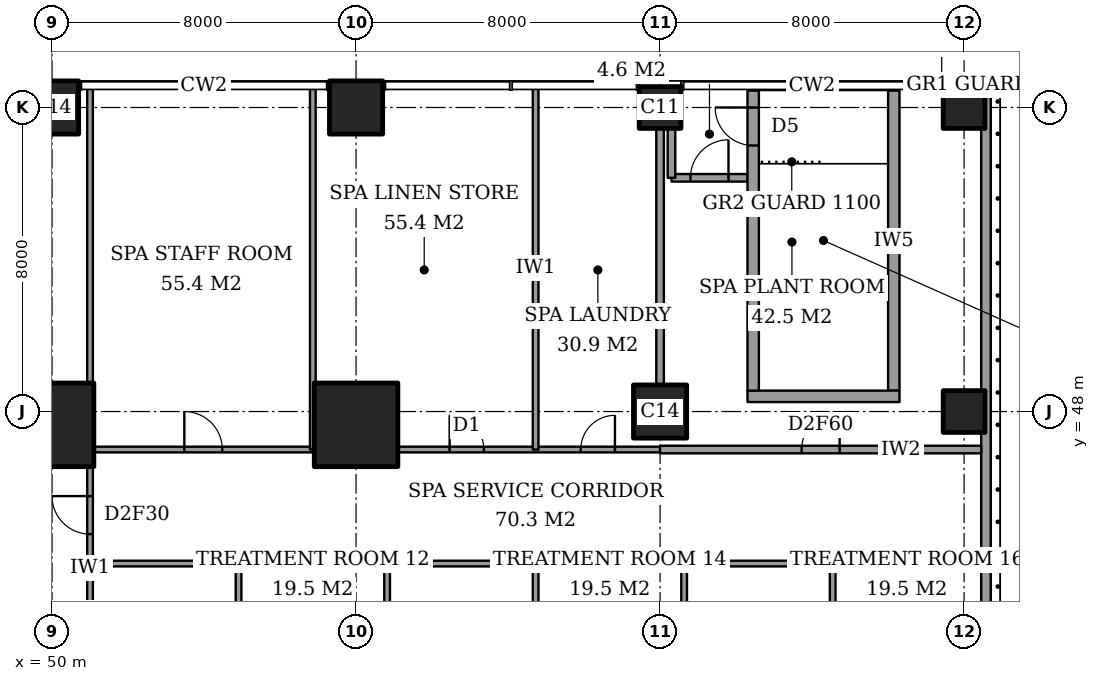
"""IFC4 building model, lengths in metres.
Left out: names, types, materials, properties, quantities, classifications, styles, units other than length and angle.
Written with IfcOpenShell. Run it as: python <this file> out.ifc"""

import sys

from ifc_helpers import new_model, si_unit, direction, frame, frame_2d, origin, origin_2d, place, context, subcontext, project, spatial, rectangle, extrude, element, fill, save


model = new_model("IFC4")
c1 = context("Model", 3, precision=1e-05, world=origin(), true_north=direction((0.0, 1.0)))
c2 = subcontext(c1, "Body", "Model", "MODEL_VIEW")
j1 = project(units=[si_unit("LENGTHUNIT", "METRE"), si_unit("PLANEANGLEUNIT", "RADIAN")], contexts=[c1])
p1 = place(None, origin())
s1 = spatial("IfcSite", under=j1, at=p1, CompositionType="ELEMENT")
p2 = place(p1, origin())
s2 = spatial("IfcBuilding", under=s1, at=p2, CompositionType="ELEMENT")
p3 = place(p2, frame((0.0, 0.0, 11.0)))
s3 = spatial("IfcBuildingStorey", under=s2, at=p3, CompositionType="ELEMENT", Elevation=11.0)
p4 = place(p3, frame((50.0, 47.65, 0.0), z_axis=(0.0, 0.0, 1.0), x_axis=(1.0, 0.0, 0.0)))
e1 = element("IfcColumn", 1, at=p4, inside=s3, PredefinedType="COLUMN", context=c2, shape_type="SweptSolid", body=[
    extrude(rectangle(XDim=2.2, YDim=2.2, at=origin_2d()), origin(), (0.0, 0.0, 1.0), 5.0),
])
p5 = place(p3, frame((50.0, 56.0, 0.0), z_axis=(0.0, 0.0, 1.0), x_axis=(1.0, 0.0, 0.0)))
e2 = element("IfcColumn", 2, at=p5, inside=s3, PredefinedType="COLUMN", context=c2, shape_type="SweptSolid", body=[
    extrude(rectangle(XDim=1.4, YDim=1.4, at=origin_2d()), origin(), (0.0, 0.0, 1.0), 5.0),
])
p6 = place(p3, frame((58.0, 47.65, 0.0), z_axis=(0.0, 0.0, 1.0), x_axis=(1.0, 0.0, 0.0)))
e3 = element("IfcColumn", 3, at=p6, inside=s3, PredefinedType="COLUMN", context=c2, shape_type="SweptSolid", body=[
    extrude(rectangle(XDim=2.2, YDim=2.2, at=origin_2d()), origin(), (0.0, 0.0, 1.0), 5.0),
])
for number, where, z_axis, x_axis in (
    (4, (58.0, 56.0, 0.0), (0.0, 0.0, 1.0), (1.0, 0.0, 0.0)),
    (5, (66.0, 48.0, 0.0), (0.0, 0.0, 1.0), (1.0, 0.0, 0.0)),
):
    element("IfcColumn", number, at=place(p3, frame(where, z_axis=z_axis, x_axis=x_axis)), inside=s3, PredefinedType="COLUMN", context=c2, shape_type="SweptSolid", body=[
        extrude(rectangle(XDim=1.4, YDim=1.4, at=origin_2d()), origin(), (0.0, 0.0, 1.0), 5.0),
    ])
for number, where, z_axis, x_axis in (
    (6, (66.0, 56.0, 0.0), (0.0, 0.0, 1.0), (1.0, 0.0, 0.0)),
    (7, (74.0, 48.0, 0.0), (0.0, 0.0, 1.0), (1.0, 0.0, 0.0)),
    (8, (74.0, 56.0, 0.0), (0.0, 0.0, 1.0), (1.0, 0.0, 0.0)),
):
    element("IfcColumn", number, at=place(p3, frame(where, z_axis=z_axis, x_axis=x_axis)), inside=s3, PredefinedType="COLUMN", context=c2, shape_type="SweptSolid", body=[
        extrude(rectangle(XDim=1.1, YDim=1.1, at=origin_2d()), origin(), (0.0, 0.0, 1.0), 5.0),
    ])
p7 = place(p3, frame((74.575, -8.575, 0.0), z_axis=(0.0, 0.0, 1.0), x_axis=(0.0, 1.0, 0.0)))
e9 = element("IfcWall", 9, at=p7, inside=s3, PredefinedType="SOLIDWALL", context=c2, shape_type="SweptSolid", body=[
    extrude(rectangle(XDim=65.15, YDim=0.25, at=frame_2d((32.575, 0.0))), origin(), (0.0, 0.0, 1.0), 5.0),
])
p8 = place(p7, frame((12.075, 0.0, 0.0)))
e10 = element("IfcOpeningElement", 10, at=p8, cuts=e9, PredefinedType="OPENING", context=c2, shape_type="SweptSolid", body=[
    extrude(rectangle(XDim=1.0, YDim=2.4, at=frame_2d((0.5, 1.2))), frame((0.0, 0.135, 0.0), z_axis=(0.0, -1.0, 0.0), x_axis=(1.0, 0.0, 0.0)), (0.0, 0.0, 1.0), 0.27),
])
p9 = place(p7, frame((28.075, 0.0, 0.0)))
e11 = element("IfcOpeningElement", 11, at=p9, cuts=e9, PredefinedType="OPENING", context=c2, shape_type="SweptSolid", body=[
    extrude(rectangle(XDim=1.0, YDim=2.4, at=frame_2d((0.5, 1.2))), frame((0.0, 0.135, 0.0), z_axis=(0.0, -1.0, 0.0), x_axis=(1.0, 0.0, 0.0)), (0.0, 0.0, 1.0), 0.27),
])
p10 = place(p7, frame((41.275, 0.0, 0.0)))
e12 = element("IfcOpeningElement", 12, at=p10, cuts=e9, PredefinedType="OPENING", context=c2, shape_type="SweptSolid", body=[
    extrude(rectangle(XDim=1.0, YDim=2.4, at=frame_2d((0.5, 1.2))), frame((0.0, 0.135, 0.0), z_axis=(0.0, -1.0, 0.0), x_axis=(1.0, 0.0, 0.0)), (0.0, 0.0, 1.0), 0.27),
])
p11 = place(p3, frame((51.0, 44.0, 0.0), z_axis=(0.0, 0.0, 1.0), x_axis=(1.0, 0.0, 0.0)))
e13 = element("IfcWall", 13, at=p11, inside=s3, PredefinedType="PARTITIONING", context=c2, shape_type="SweptSolid", body=[
    extrude(rectangle(XDim=23.45, YDim=0.15, at=frame_2d((11.725, 0.0))), origin(), (0.0, 0.0, 1.0), 4.7),
])
p12 = place(p3, frame((66.0, 47.0, 0.0), z_axis=(0.0, 0.0, 1.0), x_axis=(1.0, 0.0, 0.0)))
e14 = element("IfcWall", 14, at=p12, inside=s3, PredefinedType="PARTITIONING", context=c2, shape_type="SweptSolid", body=[
    extrude(rectangle(XDim=8.45, YDim=0.2, at=frame_2d((4.225, 0.0))), origin(), (0.0, 0.0, 1.0), 4.7),
])
p13 = place(p12, frame((3.725, 0.0, 0.0)))
e15 = element("IfcOpeningElement", 15, at=p13, cuts=e14, PredefinedType="OPENING", context=c2, shape_type="SweptSolid", body=[
    extrude(rectangle(XDim=1.0, YDim=2.1, at=frame_2d((0.5, 1.05))), frame((0.0, 0.11, 0.0), z_axis=(0.0, -1.0, 0.0), x_axis=(1.0, 0.0, 0.0)), (0.0, 0.0, 1.0), 0.22),
])
p14 = place(p3, frame((51.1, 47.0, 0.0), z_axis=(0.0, 0.0, 1.0), x_axis=(1.0, 0.0, 0.0)))
e16 = element("IfcWall", 16, at=p14, inside=s3, PredefinedType="PARTITIONING", context=c2, shape_type="SweptSolid", body=[
    extrude(rectangle(XDim=5.8, YDim=0.15, at=frame_2d((2.9, 0.0))), origin(), (0.0, 0.0, 1.0), 4.7),
])
p15 = place(p14, frame((2.381, 0.0, 0.0)))
e17 = element("IfcOpeningElement", 17, at=p15, cuts=e16, PredefinedType="OPENING", context=c2, shape_type="SweptSolid", body=[
    extrude(rectangle(XDim=1.0, YDim=2.1, at=frame_2d((0.5, 1.05))), frame((0.0, 0.085, 0.0), z_axis=(0.0, -1.0, 0.0), x_axis=(1.0, 0.0, 0.0)), (0.0, 0.0, 1.0), 0.17),
])
p16 = place(p3, frame((59.1, 47.0, 0.0), z_axis=(0.0, 0.0, 1.0), x_axis=(1.0, 0.0, 0.0)))
e18 = element("IfcWall", 18, at=p16, inside=s3, PredefinedType="PARTITIONING", context=c2, shape_type="SweptSolid", body=[
    extrude(rectangle(XDim=6.9, YDim=0.15, at=frame_2d((3.45, 0.0))), origin(), (0.0, 0.0, 1.0), 4.7),
])
p17 = place(p16, frame((1.363, 0.0, 0.0)))
e19 = element("IfcOpeningElement", 19, at=p17, cuts=e18, PredefinedType="OPENING", context=c2, shape_type="SweptSolid", body=[
    extrude(rectangle(XDim=0.9, YDim=2.1, at=frame_2d((0.45, 1.05))), frame((0.0, 0.085, 0.0), z_axis=(0.0, -1.0, 0.0), x_axis=(1.0, 0.0, 0.0)), (0.0, 0.0, 1.0), 0.17),
])
p18 = place(p16, frame((4.812, 0.0, 0.0)))
e20 = element("IfcOpeningElement", 20, at=p18, cuts=e18, PredefinedType="OPENING", context=c2, shape_type="SweptSolid", body=[
    extrude(rectangle(XDim=0.9, YDim=2.1, at=frame_2d((0.45, 1.05))), frame((0.0, 0.085, 0.0), z_axis=(0.0, -1.0, 0.0), x_axis=(1.0, 0.0, 0.0)), (0.0, 0.0, 1.0), 0.17),
])
p19 = place(p3, frame((66.3, 54.15, 0.0), z_axis=(0.0, 0.0, 1.0), x_axis=(1.0, 0.0, 0.0)))
e21 = element("IfcWall", 21, at=p19, inside=s3, PredefinedType="PARTITIONING", context=c2, shape_type="SweptSolid", body=[
    extrude(rectangle(XDim=2.0, YDim=0.2, at=frame_2d((1.0, 0.0))), origin(), (0.0, 0.0, 1.0), 4.7),
])
p20 = place(p19, frame((0.5, 0.0, 0.0)))
e22 = element("IfcOpeningElement", 22, at=p20, cuts=e21, PredefinedType="OPENING", context=c2, shape_type="SweptSolid", body=[
    extrude(rectangle(XDim=1.0, YDim=2.1, at=frame_2d((0.5, 1.05))), frame((0.0, 0.11, 0.0), z_axis=(0.0, -1.0, 0.0), x_axis=(1.0, 0.0, 0.0)), (0.0, 0.0, 1.0), 0.22),
])
p21 = place(p3, frame((51.0, 41.2, 0.0), z_axis=(0.0, 0.0, 1.0), x_axis=(0.0, 1.0, 0.0)))
e23 = element("IfcWall", 23, at=p21, inside=s3, PredefinedType="PARTITIONING", context=c2, shape_type="SweptSolid", body=[
    extrude(rectangle(XDim=5.35, YDim=0.15, at=frame_2d((2.675, 0.0))), origin(), (0.0, 0.0, 1.0), 4.7),
])
p22 = place(p21, frame((3.575, 0.0, 0.0)))
e24 = element("IfcOpeningElement", 24, at=p22, cuts=e23, PredefinedType="OPENING", context=c2, shape_type="SweptSolid", body=[
    extrude(rectangle(XDim=1.0, YDim=2.1, at=frame_2d((0.5, 1.05))), frame((0.0, 0.085, 0.0), z_axis=(0.0, -1.0, 0.0), x_axis=(1.0, 0.0, 0.0)), (0.0, 0.0, 1.0), 0.17),
])
p23 = place(p3, frame((51.0, 48.75, 0.0), z_axis=(0.0, 0.0, 1.0), x_axis=(0.0, 1.0, 0.0)))
e25 = element("IfcWall", 25, at=p23, inside=s3, PredefinedType="PARTITIONING", context=c2, shape_type="SweptSolid", body=[
    extrude(rectangle(XDim=7.811, YDim=0.15, at=frame_2d((3.906, 0.0))), origin(), (0.0, 0.0, 1.0), 4.7),
])
p24 = place(p3, frame((54.908, 39.0, 0.0), z_axis=(0.0, 0.0, 1.0), x_axis=(0.0, 1.0, 0.0)))
e26 = element("IfcWall", 26, at=p24, inside=s3, PredefinedType="PARTITIONING", context=c2, shape_type="SweptSolid", body=[
    extrude(rectangle(XDim=5.0, YDim=0.15, at=frame_2d((2.5, 0.0))), origin(), (0.0, 0.0, 1.0), 4.7),
])
p25 = place(p3, frame((56.862, 47.0, 0.0), z_axis=(0.0, 0.0, 1.0), x_axis=(0.0, 1.0, 0.0)))
e27 = element("IfcWall", 27, at=p25, inside=s3, PredefinedType="PARTITIONING", context=c2, shape_type="SweptSolid", body=[
    extrude(rectangle(XDim=9.561, YDim=0.15, at=frame_2d((4.781, 0.0))), origin(), (0.0, 0.0, 1.0), 4.7),
])
p26 = place(p3, frame((58.817, 41.0, 0.0), z_axis=(0.0, 0.0, 1.0), x_axis=(0.0, 1.0, 0.0)))
e28 = element("IfcWall", 28, at=p26, inside=s3, PredefinedType="PARTITIONING", context=c2, shape_type="SweptSolid", body=[
    extrude(rectangle(XDim=3.0, YDim=0.15, at=frame_2d((1.5, 0.0))), origin(), (0.0, 0.0, 1.0), 4.7),
])
p27 = place(p3, frame((62.725, 39.0, 0.0), z_axis=(0.0, 0.0, 1.0), x_axis=(0.0, 1.0, 0.0)))
e29 = element("IfcWall", 29, at=p27, inside=s3, PredefinedType="PARTITIONING", context=c2, shape_type="SweptSolid", body=[
    extrude(rectangle(XDim=5.0, YDim=0.15, at=frame_2d((2.5, 0.0))), origin(), (0.0, 0.0, 1.0), 4.7),
])
p28 = place(p3, frame((62.725, 47.0, 0.0), z_axis=(0.0, 0.0, 1.0), x_axis=(0.0, 1.0, 0.0)))
e30 = element("IfcWall", 30, at=p28, inside=s3, PredefinedType="PARTITIONING", context=c2, shape_type="SweptSolid", body=[
    extrude(rectangle(XDim=9.561, YDim=0.15, at=frame_2d((4.781, 0.0))), origin(), (0.0, 0.0, 1.0), 4.7),
])
p29 = place(p3, frame((66.0, 48.7, 0.0), z_axis=(0.0, 0.0, 1.0), x_axis=(0.0, 1.0, 0.0)))
e31 = element("IfcWall", 31, at=p29, inside=s3, PredefinedType="PARTITIONING", context=c2, shape_type="SweptSolid", body=[
    extrude(rectangle(XDim=6.75, YDim=0.2, at=frame_2d((3.375, 0.0))), origin(), (0.0, 0.0, 1.0), 3.3),
])
p30 = place(p3, frame((66.3, 54.15, 0.0), z_axis=(0.0, 0.0, 1.0), x_axis=(0.0, 1.0, 0.0)))
e32 = element("IfcWall", 32, at=p30, inside=s3, PredefinedType="PARTITIONING", context=c2, shape_type="SweptSolid", body=[
    extrude(rectangle(XDim=1.3, YDim=0.2, at=frame_2d((0.65, 0.0))), origin(), (0.0, 0.0, 1.0), 3.3),
])
p31 = place(p3, frame((66.633, 41.1, 0.0), z_axis=(0.0, 0.0, 1.0), x_axis=(0.0, 1.0, 0.0)))
e33 = element("IfcWall", 33, at=p31, inside=s3, PredefinedType="PARTITIONING", context=c2, shape_type="SweptSolid", body=[
    extrude(rectangle(XDim=2.9, YDim=0.15, at=frame_2d((1.45, 0.0))), origin(), (0.0, 0.0, 1.0), 4.7),
])
p32 = place(p3, frame((70.542, 39.0, 0.0), z_axis=(0.0, 0.0, 1.0), x_axis=(0.0, 1.0, 0.0)))
e34 = element("IfcWall", 34, at=p32, inside=s3, PredefinedType="PARTITIONING", context=c2, shape_type="SweptSolid", body=[
    extrude(rectangle(XDim=5.0, YDim=0.15, at=frame_2d((2.5, 0.0))), origin(), (0.0, 0.0, 1.0), 4.7),
])
p33 = place(p3, frame((68.3, 48.4, 0.0), z_axis=(0.0, 0.0, 1.0), x_axis=(1.0, 0.0, 0.0)))
e35 = element("IfcWall", 35, at=p33, inside=s3, PredefinedType="PARTITIONING", context=c2, shape_type="SweptSolid", body=[
    extrude(rectangle(XDim=4.0, YDim=0.3, at=frame_2d((2.0, 0.0))), origin(), (0.0, 0.0, 1.0), 4.7),
])
p34 = place(p3, frame((68.45, 48.55, 0.0), z_axis=(0.0, 0.0, 1.0), x_axis=(0.0, 1.0, 0.0)))
e36 = element("IfcWall", 36, at=p34, inside=s3, PredefinedType="PARTITIONING", context=c2, shape_type="SweptSolid", body=[
    extrude(rectangle(XDim=7.9, YDim=0.3, at=frame_2d((3.95, 0.0))), origin(), (0.0, 0.0, 1.0), 4.7),
])
p35 = place(p34, frame((6.45, 0.0, 0.0)))
e37 = element("IfcOpeningElement", 37, at=p35, cuts=e36, PredefinedType="OPENING", context=c2, shape_type="SweptSolid", body=[
    extrude(rectangle(XDim=1.0, YDim=2.1, at=frame_2d((0.5, 1.05))), frame((0.0, 0.16, 0.0), z_axis=(0.0, -1.0, 0.0), x_axis=(1.0, 0.0, 0.0)), (0.0, 0.0, 1.0), 0.32),
])
p36 = place(p3, frame((72.15, 48.55, 0.0), z_axis=(0.0, 0.0, 1.0), x_axis=(0.0, 1.0, 0.0)))
e38 = element("IfcWall", 38, at=p36, inside=s3, PredefinedType="PARTITIONING", context=c2, shape_type="SweptSolid", body=[
    extrude(rectangle(XDim=7.9, YDim=0.3, at=frame_2d((3.95, 0.0))), origin(), (0.0, 0.0, 1.0), 4.7),
])
for number, where, z_axis, x_axis in (
    (39, (68.45, 56.45, 0.0), (0.0, 0.0, 1.0), (0.0, 1.0, 0.0)),
    (40, (72.15, 56.45, 0.0), (0.0, 0.0, 1.0), (0.0, 1.0, 0.0)),
):
    element("IfcWall", number, at=place(p3, frame(where, z_axis=z_axis, x_axis=x_axis)), inside=s3, PredefinedType="PARTITIONING", context=c2, shape_type="SweptSolid", body=[
        extrude(rectangle(XDim=0.111, YDim=0.2, at=frame_2d((0.056, 0.0))), origin(), (0.0, 0.0, 1.0), 4.7),
    ])
p37 = place(p22, origin())
e41 = element("IfcDoor", 41, at=p37, inside=s3, OperationType="SINGLE_SWING_LEFT", PredefinedType="DOOR", context=c2, shape_type="SweptSolid", body=[
    extrude(rectangle(XDim=1.0, YDim=2.1, at=frame_2d((0.5, 1.05))), frame((0.0, 0.025, 0.0), z_axis=(0.0, -1.0, 0.0), x_axis=(1.0, 0.0, 0.0)), (0.0, 0.0, 1.0), 0.05),
])
fill(e24, e41)
p38 = place(p15, origin())
e42 = element("IfcDoor", 42, at=p38, inside=s3, OperationType="SINGLE_SWING_RIGHT", PredefinedType="DOOR", context=c2, shape_type="SweptSolid", body=[
    extrude(rectangle(XDim=1.0, YDim=2.1, at=frame_2d((0.5, 1.05))), frame((0.0, 0.025, 0.0), z_axis=(0.0, -1.0, 0.0), x_axis=(1.0, 0.0, 0.0)), (0.0, 0.0, 1.0), 0.05),
])
fill(e17, e42)
p39 = place(p17, origin())
e43 = element("IfcDoor", 43, at=p39, inside=s3, OperationType="SINGLE_SWING_RIGHT", PredefinedType="DOOR", context=c2, shape_type="SweptSolid", body=[
    extrude(rectangle(XDim=0.9, YDim=2.1, at=frame_2d((0.45, 1.05))), frame((0.0, 0.025, 0.0), z_axis=(0.0, -1.0, 0.0), x_axis=(1.0, 0.0, 0.0)), (0.0, 0.0, 1.0), 0.05),
])
fill(e19, e43)
p40 = place(p18, origin())
e44 = element("IfcDoor", 44, at=p40, inside=s3, OperationType="SINGLE_SWING_LEFT", PredefinedType="DOOR", context=c2, shape_type="SweptSolid", body=[
    extrude(rectangle(XDim=0.9, YDim=2.1, at=frame_2d((0.45, 1.05))), frame((0.0, 0.025, 0.0), z_axis=(0.0, -1.0, 0.0), x_axis=(1.0, 0.0, 0.0)), (0.0, 0.0, 1.0), 0.05),
])
fill(e20, e44)
p41 = place(p13, origin())
e45 = element("IfcDoor", 45, at=p41, inside=s3, OperationType="SINGLE_SWING_LEFT", PredefinedType="DOOR", context=c2, shape_type="SweptSolid", body=[
    extrude(rectangle(XDim=1.0, YDim=2.1, at=frame_2d((0.5, 1.05))), frame((0.0, 0.025, 0.0), z_axis=(0.0, -1.0, 0.0), x_axis=(1.0, 0.0, 0.0)), (0.0, 0.0, 1.0), 0.05),
])
fill(e15, e45)
p42 = place(p20, origin())
e46 = element("IfcDoor", 46, at=p42, inside=s3, OperationType="SINGLE_SWING_LEFT", PredefinedType="DOOR", context=c2, shape_type="SweptSolid", body=[
    extrude(rectangle(XDim=1.0, YDim=2.1, at=frame_2d((0.5, 1.05))), frame((0.0, 0.025, 0.0), z_axis=(0.0, -1.0, 0.0), x_axis=(1.0, 0.0, 0.0)), (0.0, 0.0, 1.0), 0.05),
])
fill(e22, e46)
p43 = place(p35, origin())
e47 = element("IfcDoor", 47, at=p43, inside=s3, OperationType="SINGLE_SWING_LEFT", PredefinedType="DOOR", context=c2, shape_type="SweptSolid", body=[
    extrude(rectangle(XDim=1.0, YDim=2.1, at=frame_2d((0.5, 1.05))), frame((0.0, 0.025, 0.0), z_axis=(0.0, -1.0, 0.0), x_axis=(1.0, 0.0, 0.0)), (0.0, 0.0, 1.0), 0.05),
])
fill(e37, e47)
save(model, sys.argv[1])
